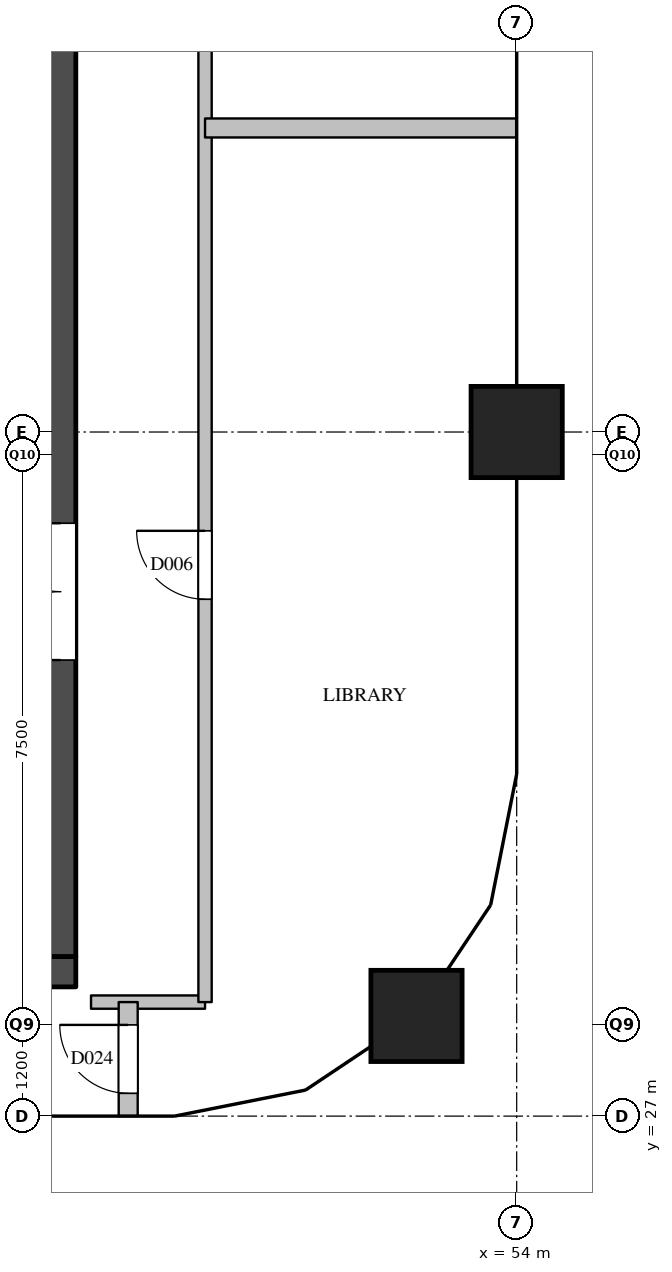
"""IFC4 building model, lengths in metres.
Left out: names, types, materials, properties, quantities, classifications, styles, units other than length and angle.
Written with IfcOpenShell. Run it as: python <this file> out.ifc"""

import sys

from ifc_helpers import new_model, si_unit, direction, frame, frame_2d, origin, origin_2d, place, context, subcontext, project, spatial, rectangle, extrude, element, fill, save


model = new_model("IFC4")
c1 = context("Model", 3, precision=1e-05, world=origin(), true_north=direction((0.0, 1.0)))
c2 = subcontext(c1, "Body", "Model", "MODEL_VIEW")
j1 = project(units=[si_unit("LENGTHUNIT", "METRE"), si_unit("PLANEANGLEUNIT", "RADIAN")], contexts=[c1])
p1 = place(None, origin())
s1 = spatial("IfcSite", under=j1, at=p1, CompositionType="ELEMENT")
p2 = place(p1, origin())
s2 = spatial("IfcBuilding", under=s1, at=p2, CompositionType="ELEMENT")
p3 = place(p2, frame((0.0, 0.0, 238.4)))
s3 = spatial("IfcBuildingStorey", under=s2, at=p3, CompositionType="ELEMENT", Elevation=238.4)
for number, where, z_axis, x_axis in (
    (1, (52.682, 28.318, 0.0), (0.0, 0.0, 1.0), (1.0, 0.0, 0.0)),
    (2, (54.0, 36.0, 0.0), (0.0, 0.0, 1.0), (1.0, 0.0, 0.0)),
):
    element("IfcColumn", number, at=place(p3, frame(where, z_axis=z_axis, x_axis=x_axis)), inside=s3, PredefinedType="COLUMN", context=c2, shape_type="SweptSolid", body=[
        extrude(rectangle(XDim=1.2, YDim=1.2, at=origin_2d()), origin(), (0.0, 0.0, 1.0), 3.9),
    ])
p4 = place(p3, frame((36.2, 28.9, 0.0), z_axis=(0.0, 0.0, 1.0), x_axis=(1.0, 0.0, 0.0)))
e3 = element("IfcWall", 3, at=p4, inside=s3, PredefinedType="SHEAR", context=c2, shape_type="SweptSolid", body=[
    extrude(rectangle(XDim=12.0, YDim=0.4, at=frame_2d((6.0, 0.0))), origin(), (0.0, 0.0, 1.0), 3.6),
])
p5 = place(p4, frame((0.85, 0.0, 0.0)))
e4 = element("IfcOpeningElement", 4, at=p5, cuts=e3, PredefinedType="OPENING", context=c2, shape_type="SweptSolid", body=[
    extrude(rectangle(XDim=1.2, YDim=2.1, at=frame_2d((0.6, 1.05))), frame((0.0, 0.21, 0.0), z_axis=(0.0, -1.0, 0.0), x_axis=(1.0, 0.0, 0.0)), (0.0, 0.0, 1.0), 0.42),
])
p6 = place(p4, frame((2.95, 0.0, 0.0)))
e5 = element("IfcOpeningElement", 5, at=p6, cuts=e3, PredefinedType="OPENING", context=c2, shape_type="SweptSolid", body=[
    extrude(rectangle(XDim=1.2, YDim=2.1, at=frame_2d((0.6, 1.05))), frame((0.0, 0.21, 0.0), z_axis=(0.0, -1.0, 0.0), x_axis=(1.0, 0.0, 0.0)), (0.0, 0.0, 1.0), 0.42),
])
p7 = place(p4, frame((5.05, 0.0, 0.0)))
e6 = element("IfcOpeningElement", 6, at=p7, cuts=e3, PredefinedType="OPENING", context=c2, shape_type="SweptSolid", body=[
    extrude(rectangle(XDim=1.2, YDim=2.1, at=frame_2d((0.6, 1.05))), frame((0.0, 0.21, 0.0), z_axis=(0.0, -1.0, 0.0), x_axis=(1.0, 0.0, 0.0)), (0.0, 0.0, 1.0), 0.42),
])
p8 = place(p3, frame((48.0, 29.1, 0.0), z_axis=(0.0, 0.0, 1.0), x_axis=(0.0, 1.0, 0.0)))
e7 = element("IfcWall", 7, at=p8, inside=s3, PredefinedType="SHEAR", context=c2, shape_type="SweptSolid", body=[
    extrude(rectangle(XDim=20.3, YDim=0.4, at=frame_2d((10.15, 0.0))), origin(), (0.0, 0.0, 1.0), 3.6),
])
p9 = place(p8, frame((12.5, 0.0, 0.0)))
e8 = element("IfcOpeningElement", 8, at=p9, cuts=e7, PredefinedType="OPENING", context=c2, shape_type="SweptSolid", body=[
    extrude(rectangle(XDim=0.7, YDim=2.1, at=frame_2d((0.35, 1.05))), frame((0.0, 0.21, 0.0), z_axis=(0.0, -1.0, 0.0), x_axis=(1.0, 0.0, 0.0)), (0.0, 0.0, 1.0), 0.42),
])
p10 = place(p8, frame((3.9, 0.0, 0.0)))
e9 = element("IfcOpeningElement", 9, at=p10, cuts=e7, PredefinedType="OPENING", context=c2, shape_type="SweptSolid", body=[
    extrude(rectangle(XDim=1.8, YDim=2.1, at=frame_2d((0.9, 1.05))), frame((0.0, 0.21, 0.0), z_axis=(0.0, -1.0, 0.0), x_axis=(1.0, 0.0, 0.0)), (0.0, 0.0, 1.0), 0.42),
])
p11 = place(p3, frame((48.4, 28.5, 0.0), z_axis=(0.0, 0.0, 1.0), x_axis=(1.0, 0.0, 0.0)))
e10 = element("IfcWall", 10, at=p11, inside=s3, PredefinedType="PARTITIONING", context=c2, shape_type="SweptSolid", body=[
    extrude(rectangle(XDim=1.5, YDim=0.175, at=frame_2d((0.75, 0.0))), origin(), (0.0, 0.0, 1.0), 3.6),
])
p12 = place(p3, frame((49.9, 28.5, 0.0), z_axis=(0.0, 0.0, 1.0), x_axis=(0.0, 1.0, 0.0)))
e11 = element("IfcWall", 11, at=p12, inside=s3, PredefinedType="PARTITIONING", context=c2, shape_type="SweptSolid", body=[
    extrude(rectangle(XDim=23.0, YDim=0.175, at=frame_2d((11.5, 0.0))), origin(), (0.0, 0.0, 1.0), 3.6),
])
p13 = place(p12, frame((5.3, 0.0, 0.0)))
e12 = element("IfcOpeningElement", 12, at=p13, cuts=e11, PredefinedType="OPENING", context=c2, shape_type="SweptSolid", body=[
    extrude(rectangle(XDim=0.9, YDim=2.1, at=frame_2d((0.45, 1.05))), frame((0.0, 0.097, 0.0), z_axis=(0.0, -1.0, 0.0), x_axis=(1.0, 0.0, 0.0)), (0.0, 0.0, 1.0), 0.195),
])
p14 = place(p12, frame((16.05, 0.0, 0.0)))
e13 = element("IfcOpeningElement", 13, at=p14, cuts=e11, PredefinedType="OPENING", context=c2, shape_type="SweptSolid", body=[
    extrude(rectangle(XDim=0.9, YDim=2.1, at=frame_2d((0.45, 1.05))), frame((0.0, 0.097, 0.0), z_axis=(0.0, -1.0, 0.0), x_axis=(1.0, 0.0, 0.0)), (0.0, 0.0, 1.0), 0.195),
])
p15 = place(p3, frame((49.9, 40.0, 0.0), z_axis=(0.0, 0.0, 1.0), x_axis=(1.0, 0.0, 0.0)))
e14 = element("IfcWall", 14, at=p15, inside=s3, PredefinedType="PARTITIONING", context=c2, shape_type="SweptSolid", body=[
    extrude(rectangle(XDim=4.1, YDim=0.25, at=frame_2d((2.05, 0.0))), origin(), (0.0, 0.0, 1.0), 2.6),
])
p16 = place(p3, frame((48.889, 27.0, 0.0), z_axis=(0.0, 0.0, 1.0), x_axis=(0.0, 1.0, 0.0)))
e15 = element("IfcWall", 15, at=p16, inside=s3, PredefinedType="PARTITIONING", context=c2, shape_type="SweptSolid", body=[
    extrude(rectangle(XDim=1.5, YDim=0.25, at=frame_2d((0.75, 0.0))), origin(), (0.0, 0.0, 1.0), 2.6),
])
p17 = place(p16, frame((0.3, 0.0, 0.0)))
e16 = element("IfcOpeningElement", 16, at=p17, cuts=e15, PredefinedType="OPENING", context=c2, shape_type="SweptSolid", body=[
    extrude(rectangle(XDim=0.9, YDim=2.1, at=frame_2d((0.45, 1.05))), frame((0.0, 0.135, 0.0), z_axis=(0.0, -1.0, 0.0), x_axis=(1.0, 0.0, 0.0)), (0.0, 0.0, 1.0), 0.27),
])
p18 = place(p10, origin())
e17 = element("IfcDoor", 17, at=p18, inside=s3, OperationType="DOUBLE_DOOR_SINGLE_SWING", PredefinedType="DOOR", context=c2, shape_type="SweptSolid", body=[
    extrude(rectangle(XDim=1.8, YDim=2.1, at=frame_2d((0.9, 1.05))), frame((0.0, 0.025, 0.0), z_axis=(0.0, -1.0, 0.0), x_axis=(1.0, 0.0, 0.0)), (0.0, 0.0, 1.0), 0.05),
])
fill(e9, e17)
p19 = place(p13, origin())
e18 = element("IfcDoor", 18, at=p19, inside=s3, OperationType="SINGLE_SWING_RIGHT", PredefinedType="DOOR", context=c2, shape_type="SweptSolid", body=[
    extrude(rectangle(XDim=0.9, YDim=2.1, at=frame_2d((0.45, 1.05))), frame((0.0, 0.025, 0.0), z_axis=(0.0, -1.0, 0.0), x_axis=(1.0, 0.0, 0.0)), (0.0, 0.0, 1.0), 0.05),
])
fill(e12, e18)
p20 = place(p17, origin())
e19 = element("IfcDoor", 19, at=p20, inside=s3, OperationType="SINGLE_SWING_RIGHT", PredefinedType="DOOR", context=c2, shape_type="SweptSolid", body=[
    extrude(rectangle(XDim=0.9, YDim=2.1, at=frame_2d((0.45, 1.05))), frame((0.0, 0.025, 0.0), z_axis=(0.0, -1.0, 0.0), x_axis=(1.0, 0.0, 0.0)), (0.0, 0.0, 1.0), 0.05),
])
fill(e16, e19)
save(model, sys.argv[1])
